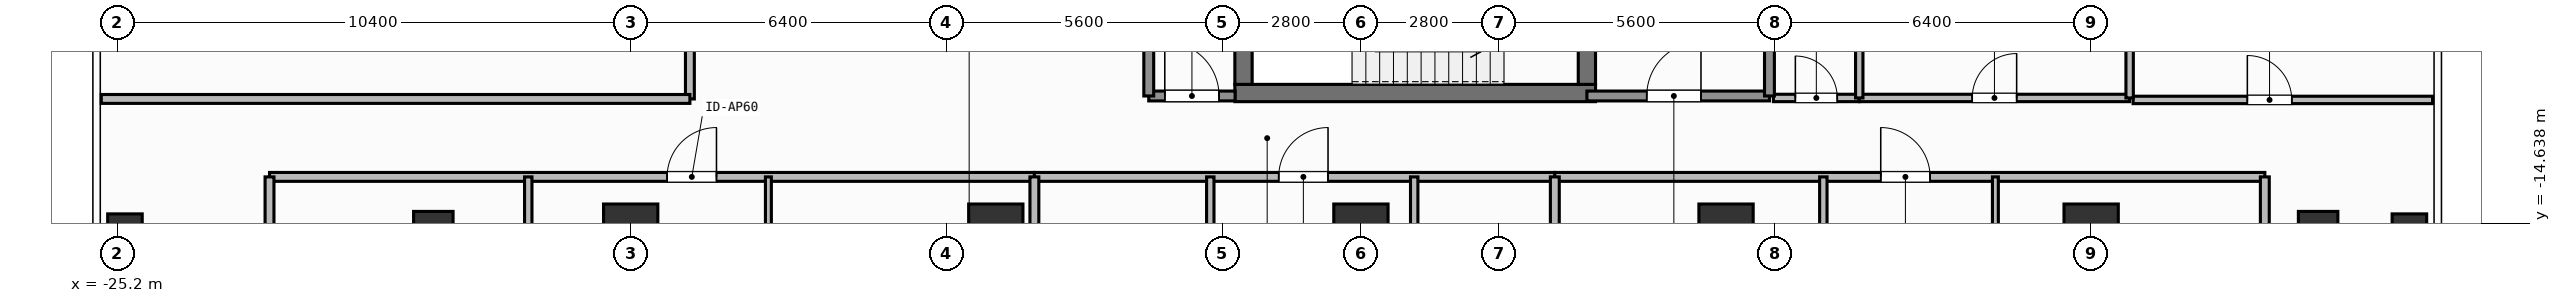
"""IFC4 building model, lengths in metres.
Left out: names, types, materials, properties, quantities, classifications, styles, units other than length and angle.
Written with IfcOpenShell. Run it as: python <this file> out.ifc"""

import sys

from ifc_helpers import new_model, si_unit, direction, frame, frame_2d, origin, origin_2d, place, context, subcontext, project, spatial, rectangle, hollow_rectangle, extrude, element, fill, save


model = new_model("IFC4")
c1 = context("Model", 3, precision=1e-05, world=origin(), true_north=direction((0.0, 1.0)))
c2 = subcontext(c1, "Body", "Model", "MODEL_VIEW")
j1 = project(units=[si_unit("LENGTHUNIT", "METRE"), si_unit("PLANEANGLEUNIT", "RADIAN")], contexts=[c1])
p1 = place(None, origin())
s1 = spatial("IfcSite", under=j1, at=p1, CompositionType="ELEMENT")
p2 = place(p1, origin())
s2 = spatial("IfcBuilding", under=s1, at=p2, CompositionType="ELEMENT")
p3 = place(p2, frame((0.0, 0.0, 179.7)))
s3 = spatial("IfcBuildingStorey", under=s2, at=p3, CompositionType="ELEMENT", Elevation=179.7)
p4 = place(p3, frame((-2.555, -12.0, 0.0), z_axis=(0.0, 0.0, 1.0), x_axis=(1.0, 0.0, 0.0)))
e1 = element("IfcWall", 1, at=p4, inside=s3, PredefinedType="SHEAR", context=c2, shape_type="SweptSolid", body=[
    extrude(rectangle(XDim=7.31, YDim=0.35, at=frame_2d((3.655, 0.0))), origin(), (0.0, 0.0, 1.0), 3.9),
])
p5 = place(p3, frame((-2.38, -11.825, 0.0), z_axis=(0.0, 0.0, 1.0), x_axis=(0.0, 1.0, 0.0)))
e2 = element("IfcWall", 2, at=p5, inside=s3, PredefinedType="SHEAR", context=c2, shape_type="SweptSolid", body=[
    extrude(rectangle(XDim=2.925, YDim=0.35, at=frame_2d((1.462, 0.0))), origin(), (0.0, 0.0, 1.0), 3.9),
])
p6 = place(p3, frame((4.58, -8.9, 0.0), z_axis=(0.0, 0.0, 1.0), x_axis=(0.0, -1.0, 0.0)))
e3 = element("IfcWall", 3, at=p6, inside=s3, PredefinedType="SHEAR", context=c2, shape_type="SweptSolid", body=[
    extrude(rectangle(XDim=2.925, YDim=0.35, at=frame_2d((1.462, 0.0))), origin(), (0.0, 0.0, 1.0), 3.9),
])
p7 = place(p6, frame((0.913, 0.0, 0.0)))
e4 = element("IfcOpeningElement", 4, at=p7, cuts=e3, PredefinedType="OPENING", context=c2, shape_type="SweptSolid", body=[
    extrude(rectangle(XDim=1.1, YDim=2.15, at=frame_2d((0.55, 1.075))), frame((0.0, 0.185, 0.0), z_axis=(0.0, -1.0, 0.0), x_axis=(1.0, 0.0, 0.0)), (0.0, 0.0, 1.0), 0.37),
])
for number, where, z_axis, x_axis in (
    (5, (-14.8, -14.8, 0.0), (0.0, 0.0, 1.0), (1.0, 0.0, 0.0)),
    (6, (-7.4, -14.8, 0.0), (0.0, 0.0, 1.0), (1.0, 0.0, 0.0)),
    (7, (0.0, -14.8, 0.0), (0.0, 0.0, 1.0), (1.0, 0.0, 0.0)),
    (8, (7.4, -14.8, 0.0), (0.0, 0.0, 1.0), (1.0, 0.0, 0.0)),
    (9, (14.8, -14.8, 0.0), (0.0, 0.0, 1.0), (1.0, 0.0, 0.0)),
):
    element("IfcColumn", number, at=place(p3, frame(where, z_axis=z_axis, x_axis=x_axis)), inside=s3, PredefinedType="COLUMN", context=c2, shape_type="SweptSolid", body=[
        extrude(rectangle(XDim=1.1, YDim=1.1, at=origin_2d()), origin(), (0.0, 0.0, 1.0), 3.9),
    ])
for number, where, z_axis, x_axis in (
    (10, (-18.8, -14.8, 0.0), (0.0, 0.0, 1.0), (1.0, 0.0, 0.0)),
    (11, (19.4, -14.8, 0.0), (0.0, 0.0, 1.0), (1.0, 0.0, 0.0)),
):
    element("IfcColumn", number, at=place(p3, frame(where, z_axis=z_axis, x_axis=x_axis)), inside=s3, PredefinedType="COLUMN", context=c2, shape_type="SweptSolid", body=[
        extrude(hollow_rectangle(XDim=0.8, YDim=0.8, WallThickness=0.036, at=origin_2d()), origin(), (0.0, 0.0, 1.0), 3.9),
    ])
for number, where, z_axis, x_axis in (
    (12, (-25.05, -14.8, 0.0), (0.0, 0.0, 1.0), (1.0, 0.0, 0.0)),
    (13, (21.25, -14.8, 0.0), (0.0, 0.0, 1.0), (1.0, 0.0, 0.0)),
):
    element("IfcColumn", number, at=place(p3, frame(where, z_axis=z_axis, x_axis=x_axis)), inside=s3, PredefinedType="COLUMN", context=c2, shape_type="SweptSolid", body=[
        extrude(hollow_rectangle(XDim=0.7, YDim=0.7, WallThickness=0.032, at=origin_2d()), origin(), (0.0, 0.0, 1.0), 3.9),
    ])
p8 = place(p3, frame((4.58, -12.06, 0.0), z_axis=(0.0, 0.0, 1.0), x_axis=(1.0, 0.0, 0.0)))
e14 = element("IfcWall", 14, at=p8, inside=s3, PredefinedType="SOLIDWALL", context=c2, shape_type="SweptSolid", body=[
    extrude(rectangle(XDim=3.7, YDim=0.2, at=frame_2d((1.85, 0.0))), origin(), (0.0, 0.0, 1.0), 3.68),
])
p9 = place(p8, frame((1.212, 0.0, 0.0)))
e15 = element("IfcOpeningElement", 15, at=p9, cuts=e14, PredefinedType="OPENING", context=c2, shape_type="SweptSolid", body=[
    extrude(rectangle(XDim=1.1, YDim=2.15, at=frame_2d((0.55, 1.075))), frame((0.0, 0.11, 0.0), z_axis=(0.0, -1.0, 0.0), x_axis=(1.0, 0.0, 0.0)), (0.0, 0.0, 1.0), 0.22),
])
p10 = place(p3, frame((-4.3, -12.06, 0.0), z_axis=(0.0, 0.0, 1.0), x_axis=(1.0, 0.0, 0.0)))
e16 = element("IfcWall", 16, at=p10, inside=s3, PredefinedType="SOLIDWALL", context=c2, shape_type="SweptSolid", body=[
    extrude(rectangle(XDim=1.75, YDim=0.2, at=frame_2d((0.875, 0.0))), origin(), (0.0, 0.0, 1.0), 3.68),
])
p11 = place(p10, frame((0.325, 0.0, 0.0)))
e17 = element("IfcOpeningElement", 17, at=p11, cuts=e16, PredefinedType="OPENING", context=c2, shape_type="SweptSolid", body=[
    extrude(rectangle(XDim=1.1, YDim=2.15, at=frame_2d((0.55, 1.075))), frame((0.0, 0.11, 0.0), z_axis=(0.0, -1.0, 0.0), x_axis=(1.0, 0.0, 0.0)), (0.0, 0.0, 1.0), 0.22),
])
p12 = place(p3, frame((8.36, -12.1, 0.0), z_axis=(0.0, 0.0, 1.0), x_axis=(1.0, 0.0, 0.0)))
e18 = element("IfcWall", 18, at=p12, inside=s3, PredefinedType="PARTITIONING", context=c2, shape_type="SweptSolid", body=[
    extrude(rectangle(XDim=1.74, YDim=0.15, at=frame_2d((0.87, 0.0))), origin(), (0.0, 0.0, 1.0), 3.68),
])
p13 = place(p12, frame((0.445, 0.0, 0.0)))
e19 = element("IfcOpeningElement", 19, at=p13, cuts=e18, PredefinedType="OPENING", context=c2, shape_type="SweptSolid", body=[
    extrude(rectangle(XDim=0.85, YDim=2.1, at=frame_2d((0.425, 1.05))), frame((0.0, 0.085, 0.0), z_axis=(0.0, -1.0, 0.0), x_axis=(1.0, 0.0, 0.0)), (0.0, 0.0, 1.0), 0.17),
])
p14 = place(p3, frame((10.1, -12.1, 0.0), z_axis=(0.0, 0.0, 1.0), x_axis=(1.0, 0.0, 0.0)))
e20 = element("IfcWall", 20, at=p14, inside=s3, PredefinedType="PARTITIONING", context=c2, shape_type="SweptSolid", body=[
    extrude(rectangle(XDim=5.48, YDim=0.15, at=frame_2d((2.74, 0.0))), origin(), (0.0, 0.0, 1.0), 3.68),
])
p15 = place(p14, frame((2.29, 0.0, 0.0)))
e21 = element("IfcOpeningElement", 21, at=p15, cuts=e20, PredefinedType="OPENING", context=c2, shape_type="SweptSolid", body=[
    extrude(rectangle(XDim=0.9, YDim=2.1, at=frame_2d((0.45, 1.05))), frame((0.0, 0.085, 0.0), z_axis=(0.0, -1.0, 0.0), x_axis=(1.0, 0.0, 0.0)), (0.0, 0.0, 1.0), 0.17),
])
p16 = place(p3, frame((-22.12, -13.7, 0.0), z_axis=(0.0, 0.0, 1.0), x_axis=(1.0, 0.0, 0.0)))
e22 = element("IfcWall", 22, at=p16, inside=s3, PredefinedType="PARTITIONING", context=c2, shape_type="SweptSolid", body=[
    extrude(rectangle(XDim=15.502, YDim=0.18, at=frame_2d((7.751, 0.0))), origin(), (0.0, 0.0, 1.0), 3.68),
])
p17 = place(p16, frame((8.059, 0.0, 0.0)))
e23 = element("IfcOpeningElement", 23, at=p17, cuts=e22, PredefinedType="OPENING", context=c2, shape_type="SweptSolid", body=[
    extrude(rectangle(XDim=1.0, YDim=2.2, at=frame_2d((0.5, 1.1))), frame((0.0, 0.1, 0.0), z_axis=(0.0, -1.0, 0.0), x_axis=(1.0, 0.0, 0.0)), (0.0, 0.0, 1.0), 0.2),
])
p18 = place(p3, frame((-16.876, -19.39, 0.0), z_axis=(0.0, 0.0, 1.0), x_axis=(0.0, 1.0, 0.0)))
e24 = element("IfcWall", 24, at=p18, inside=s3, PredefinedType="PARTITIONING", context=c2, shape_type="SweptSolid", body=[
    extrude(rectangle(XDim=5.69, YDim=0.15, at=frame_2d((2.845, 0.0))), origin(), (0.0, 0.0, 1.0), 3.68),
])
p19 = place(p18, frame((2.42, 0.0, 0.0)))
e25 = element("IfcOpeningElement", 25, at=p19, cuts=e24, PredefinedType="OPENING", context=c2, shape_type="SweptSolid", body=[
    extrude(rectangle(XDim=0.85, YDim=2.1, at=frame_2d((0.425, 1.05))), frame((0.0, 0.085, 0.0), z_axis=(0.0, -1.0, 0.0), x_axis=(1.0, 0.0, 0.0)), (0.0, 0.0, 1.0), 0.17),
])
p20 = place(p3, frame((-12.009, -17.683, 0.0), z_axis=(0.0, 0.0, 1.0), x_axis=(0.0, 1.0, 0.0)))
e26 = element("IfcWall", 26, at=p20, inside=s3, PredefinedType="PARTITIONING", context=c2, shape_type="SweptSolid", body=[
    extrude(rectangle(XDim=3.983, YDim=0.12, at=frame_2d((1.992, 0.0))), origin(), (0.0, 0.0, 1.0), 3.68),
])
p21 = place(p20, frame((1.566, 0.0, 0.0)))
e27 = element("IfcOpeningElement", 27, at=p21, cuts=e26, PredefinedType="OPENING", context=c2, shape_type="SweptSolid", body=[
    extrude(rectangle(XDim=0.85, YDim=2.1, at=frame_2d((0.425, 1.05))), frame((0.0, 0.07, 0.0), z_axis=(0.0, -1.0, 0.0), x_axis=(1.0, 0.0, 0.0)), (0.0, 0.0, 1.0), 0.14),
])
p22 = place(p3, frame((-6.618, -13.7, 0.0), z_axis=(0.0, 0.0, 1.0), x_axis=(1.0, 0.0, 0.0)))
e28 = element("IfcWall", 28, at=p22, inside=s3, PredefinedType="PARTITIONING", context=c2, shape_type="SweptSolid", body=[
    extrude(rectangle(XDim=10.548, YDim=0.18, at=frame_2d((5.274, 0.0))), origin(), (0.0, 0.0, 1.0), 3.68),
])
p23 = place(p22, frame((4.951, 0.0, 0.0)))
e29 = element("IfcOpeningElement", 29, at=p23, cuts=e28, PredefinedType="OPENING", context=c2, shape_type="SweptSolid", body=[
    extrude(rectangle(XDim=1.0, YDim=2.2, at=frame_2d((0.5, 1.1))), frame((0.0, 0.1, 0.0), z_axis=(0.0, -1.0, 0.0), x_axis=(1.0, 0.0, 0.0)), (0.0, 0.0, 1.0), 0.2),
])
p24 = place(p3, frame((-3.053, -19.39, 0.0), z_axis=(0.0, 0.0, 1.0), x_axis=(0.0, 1.0, 0.0)))
e30 = element("IfcWall", 30, at=p24, inside=s3, PredefinedType="PARTITIONING", context=c2, shape_type="SweptSolid", body=[
    extrude(rectangle(XDim=5.69, YDim=0.15, at=frame_2d((2.845, 0.0))), origin(), (0.0, 0.0, 1.0), 3.68),
])
p25 = place(p24, frame((2.42, 0.0, 0.0)))
e31 = element("IfcOpeningElement", 31, at=p25, cuts=e30, PredefinedType="OPENING", context=c2, shape_type="SweptSolid", body=[
    extrude(rectangle(XDim=0.85, YDim=2.1, at=frame_2d((0.425, 1.05))), frame((0.0, 0.085, 0.0), z_axis=(0.0, -1.0, 0.0), x_axis=(1.0, 0.0, 0.0)), (0.0, 0.0, 1.0), 0.17),
])
p26 = place(p3, frame((1.08, -19.39, 0.0), z_axis=(0.0, 0.0, 1.0), x_axis=(0.0, 1.0, 0.0)))
e32 = element("IfcWall", 32, at=p26, inside=s3, PredefinedType="PARTITIONING", context=c2, shape_type="SweptSolid", body=[
    extrude(rectangle(XDim=5.69, YDim=0.15, at=frame_2d((2.845, 0.0))), origin(), (0.0, 0.0, 1.0), 3.68),
])
p27 = place(p26, frame((2.42, 0.0, 0.0)))
e33 = element("IfcOpeningElement", 33, at=p27, cuts=e32, PredefinedType="OPENING", context=c2, shape_type="SweptSolid", body=[
    extrude(rectangle(XDim=0.85, YDim=2.1, at=frame_2d((0.425, 1.05))), frame((0.0, 0.085, 0.0), z_axis=(0.0, -1.0, 0.0), x_axis=(1.0, 0.0, 0.0)), (0.0, 0.0, 1.0), 0.17),
])
p28 = place(p3, frame((3.93, -13.7, 0.0), z_axis=(0.0, 0.0, 1.0), x_axis=(1.0, 0.0, 0.0)))
e34 = element("IfcWall", 34, at=p28, inside=s3, PredefinedType="PARTITIONING", context=c2, shape_type="SweptSolid", body=[
    extrude(rectangle(XDim=14.39, YDim=0.18, at=frame_2d((7.195, 0.0))), origin(), (0.0, 0.0, 1.0), 3.68),
])
p29 = place(p28, frame((6.605, 0.0, 0.0)))
e35 = element("IfcOpeningElement", 35, at=p29, cuts=e34, PredefinedType="OPENING", context=c2, shape_type="SweptSolid", body=[
    extrude(rectangle(XDim=1.0, YDim=2.2, at=frame_2d((0.5, 1.1))), frame((0.0, 0.1, 0.0), z_axis=(0.0, -1.0, 0.0), x_axis=(1.0, 0.0, 0.0)), (0.0, 0.0, 1.0), 0.2),
])
p30 = place(p3, frame((9.372, -19.39, 0.0), z_axis=(0.0, 0.0, 1.0), x_axis=(0.0, 1.0, 0.0)))
e36 = element("IfcWall", 36, at=p30, inside=s3, PredefinedType="PARTITIONING", context=c2, shape_type="SweptSolid", body=[
    extrude(rectangle(XDim=5.69, YDim=0.15, at=frame_2d((2.845, 0.0))), origin(), (0.0, 0.0, 1.0), 3.68),
])
p31 = place(p30, frame((2.42, 0.0, 0.0)))
e37 = element("IfcOpeningElement", 37, at=p31, cuts=e36, PredefinedType="OPENING", context=c2, shape_type="SweptSolid", body=[
    extrude(rectangle(XDim=0.85, YDim=2.1, at=frame_2d((0.425, 1.05))), frame((0.0, 0.085, 0.0), z_axis=(0.0, -1.0, 0.0), x_axis=(1.0, 0.0, 0.0)), (0.0, 0.0, 1.0), 0.17),
])
p32 = place(p3, frame((12.859, -17.683, 0.0), z_axis=(0.0, 0.0, 1.0), x_axis=(0.0, 1.0, 0.0)))
e38 = element("IfcWall", 38, at=p32, inside=s3, PredefinedType="PARTITIONING", context=c2, shape_type="SweptSolid", body=[
    extrude(rectangle(XDim=3.983, YDim=0.12, at=frame_2d((1.992, 0.0))), origin(), (0.0, 0.0, 1.0), 3.68),
])
p33 = place(p32, frame((1.391, 0.0, 0.0)))
e39 = element("IfcOpeningElement", 39, at=p33, cuts=e38, PredefinedType="OPENING", context=c2, shape_type="SweptSolid", body=[
    extrude(rectangle(XDim=0.85, YDim=2.1, at=frame_2d((0.425, 1.05))), frame((0.0, 0.07, 0.0), z_axis=(0.0, -1.0, 0.0), x_axis=(1.0, 0.0, 0.0)), (0.0, 0.0, 1.0), 0.14),
])
p34 = place(p3, frame((-13.6, -12.12, 0.0), z_axis=(0.0, 0.0, 1.0), x_axis=(0.0, 1.0, 0.0)))
e40 = element("IfcWall", 40, at=p34, inside=s3, PredefinedType="PARTITIONING", context=c2, shape_type="SweptSolid", body=[
    extrude(rectangle(XDim=6.771, YDim=0.18, at=frame_2d((3.385, 0.0))), origin(), (0.0, 0.0, 1.0), 3.68),
])
p35 = place(p34, frame((1.215, 0.0, 0.0)))
e41 = element("IfcOpeningElement", 41, at=p35, cuts=e40, PredefinedType="OPENING", context=c2, shape_type="SweptSolid", body=[
    extrude(rectangle(XDim=1.0, YDim=2.2, at=frame_2d((0.5, 1.1))), frame((0.0, 0.1, 0.0), z_axis=(0.0, -1.0, 0.0), x_axis=(1.0, 0.0, 0.0)), (0.0, 0.0, 1.0), 0.2),
])
p36 = place(p3, frame((15.65, -12.14, 0.0), z_axis=(0.0, 0.0, 1.0), x_axis=(1.0, 0.0, 0.0)))
e42 = element("IfcWall", 42, at=p36, inside=s3, PredefinedType="PARTITIONING", context=c2, shape_type="SweptSolid", body=[
    extrude(rectangle(XDim=6.07, YDim=0.15, at=frame_2d((3.035, 0.0))), origin(), (0.0, 0.0, 1.0), 3.68),
])
p37 = place(p36, frame((2.316, 0.0, 0.0)))
e43 = element("IfcOpeningElement", 43, at=p37, cuts=e42, PredefinedType="OPENING", context=c2, shape_type="SweptSolid", body=[
    extrude(rectangle(XDim=0.9, YDim=2.1, at=frame_2d((0.45, 1.05))), frame((0.0, 0.085, 0.0), z_axis=(0.0, -1.0, 0.0), x_axis=(1.0, 0.0, 0.0)), (0.0, 0.0, 1.0), 0.17),
])
for number, where, z_axis, x_axis in (
    (44, (8.28, -12.06, 0.0), (0.0, 0.0, 1.0), (0.0, 1.0, 0.0)),
    (45, (-4.3, -12.06, 0.0), (0.0, 0.0, 1.0), (0.0, 1.0, 0.0)),
):
    element("IfcWall", number, at=place(p3, frame(where, z_axis=z_axis, x_axis=x_axis)), inside=s3, PredefinedType="SOLIDWALL", context=c2, shape_type="SweptSolid", body=[
        extrude(rectangle(XDim=3.26, YDim=0.2, at=frame_2d((1.63, 0.0))), origin(), (0.0, 0.0, 1.0), 3.68),
    ])
p38 = place(p3, frame((10.1, -12.1, 0.0), z_axis=(0.0, 0.0, 1.0), x_axis=(0.0, 1.0, 0.0)))
e46 = element("IfcWall", 46, at=p38, inside=s3, PredefinedType="PARTITIONING", context=c2, shape_type="SweptSolid", body=[
    extrude(rectangle(XDim=2.35, YDim=0.15, at=frame_2d((1.175, 0.0))), origin(), (0.0, 0.0, 1.0), 3.68),
])
p39 = place(p3, frame((15.58, -12.1, 0.0), z_axis=(0.0, 0.0, 1.0), x_axis=(0.0, 1.0, 0.0)))
e47 = element("IfcWall", 47, at=p39, inside=s3, PredefinedType="PARTITIONING", context=c2, shape_type="SweptSolid", body=[
    extrude(rectangle(XDim=6.25, YDim=0.15, at=frame_2d((3.125, 0.0))), origin(), (0.0, 0.0, 1.0), 3.68),
])
for number, where, z_axis, x_axis in (
    (48, (-22.12, -22.51, 0.0), (0.0, 0.0, 1.0), (0.0, 1.0, 0.0)),
    (49, (18.32, -22.51, 0.0), (0.0, 0.0, 1.0), (0.0, 1.0, 0.0)),
):
    element("IfcWall", number, at=place(p3, frame(where, z_axis=z_axis, x_axis=x_axis)), inside=s3, PredefinedType="PARTITIONING", context=c2, shape_type="SweptSolid", body=[
        extrude(rectangle(XDim=8.81, YDim=0.18, at=frame_2d((4.405, 0.0))), origin(), (0.0, 0.0, 1.0), 3.68),
    ])
for number, where, z_axis, x_axis in (
    (50, (-6.618, -23.63, 0.0), (0.0, 0.0, 1.0), (0.0, 1.0, 0.0)),
    (51, (3.93, -23.63, 0.0), (0.0, 0.0, 1.0), (0.0, 1.0, 0.0)),
):
    element("IfcWall", number, at=place(p3, frame(where, z_axis=z_axis, x_axis=x_axis)), inside=s3, PredefinedType="PARTITIONING", context=c2, shape_type="SweptSolid", body=[
        extrude(rectangle(XDim=9.93, YDim=0.18, at=frame_2d((4.965, 0.0))), origin(), (0.0, 0.0, 1.0), 3.68),
    ])
p40 = place(p3, frame((-25.53, -12.12, 0.0), z_axis=(0.0, 0.0, 1.0), x_axis=(1.0, 0.0, 0.0)))
e52 = element("IfcWall", 52, at=p40, inside=s3, PredefinedType="PARTITIONING", context=c2, shape_type="SweptSolid", body=[
    extrude(rectangle(XDim=11.93, YDim=0.18, at=frame_2d((5.965, 0.0))), origin(), (0.0, 0.0, 1.0), 3.68),
])
p41 = place(p9, origin())
e53 = element("IfcDoor", 53, at=p41, inside=s3, OperationType="SINGLE_SWING_RIGHT", PredefinedType="DOOR", context=c2, shape_type="SweptSolid", body=[
    extrude(rectangle(XDim=1.1, YDim=2.15, at=frame_2d((0.55, 1.075))), frame((0.0, 0.025, 0.0), z_axis=(0.0, -1.0, 0.0), x_axis=(1.0, 0.0, 0.0)), (0.0, 0.0, 1.0), 0.05),
])
fill(e15, e53)
p42 = place(p11, origin())
e54 = element("IfcDoor", 54, at=p42, inside=s3, OperationType="SINGLE_SWING_LEFT", PredefinedType="DOOR", context=c2, shape_type="SweptSolid", body=[
    extrude(rectangle(XDim=1.1, YDim=2.15, at=frame_2d((0.55, 1.075))), frame((0.0, 0.025, 0.0), z_axis=(0.0, -1.0, 0.0), x_axis=(1.0, 0.0, 0.0)), (0.0, 0.0, 1.0), 0.05),
])
fill(e17, e54)
p43 = place(p13, origin())
e55 = element("IfcDoor", 55, at=p43, inside=s3, OperationType="SINGLE_SWING_LEFT", PredefinedType="DOOR", context=c2, shape_type="SweptSolid", body=[
    extrude(rectangle(XDim=0.85, YDim=2.1, at=frame_2d((0.425, 1.05))), frame((0.0, 0.025, 0.0), z_axis=(0.0, -1.0, 0.0), x_axis=(1.0, 0.0, 0.0)), (0.0, 0.0, 1.0), 0.05),
])
fill(e19, e55)
p44 = place(p15, origin())
e56 = element("IfcDoor", 56, at=p44, inside=s3, OperationType="SINGLE_SWING_RIGHT", PredefinedType="DOOR", context=c2, shape_type="SweptSolid", body=[
    extrude(rectangle(XDim=0.9, YDim=2.1, at=frame_2d((0.45, 1.05))), frame((0.0, 0.025, 0.0), z_axis=(0.0, -1.0, 0.0), x_axis=(1.0, 0.0, 0.0)), (0.0, 0.0, 1.0), 0.05),
])
fill(e21, e56)
p45 = place(p17, origin())
e57 = element("IfcDoor", 57, at=p45, inside=s3, OperationType="SINGLE_SWING_RIGHT", PredefinedType="DOOR", context=c2, shape_type="SweptSolid", body=[
    extrude(rectangle(XDim=1.0, YDim=2.2, at=frame_2d((0.5, 1.1))), frame((0.0, 0.025, 0.0), z_axis=(0.0, -1.0, 0.0), x_axis=(1.0, 0.0, 0.0)), (0.0, 0.0, 1.0), 0.05),
])
fill(e23, e57)
p46 = place(p23, origin())
e58 = element("IfcDoor", 58, at=p46, inside=s3, OperationType="SINGLE_SWING_RIGHT", PredefinedType="DOOR", context=c2, shape_type="SweptSolid", body=[
    extrude(rectangle(XDim=1.0, YDim=2.2, at=frame_2d((0.5, 1.1))), frame((0.0, 0.025, 0.0), z_axis=(0.0, -1.0, 0.0), x_axis=(1.0, 0.0, 0.0)), (0.0, 0.0, 1.0), 0.05),
])
fill(e29, e58)
p47 = place(p29, origin())
e59 = element("IfcDoor", 59, at=p47, inside=s3, OperationType="SINGLE_SWING_LEFT", PredefinedType="DOOR", context=c2, shape_type="SweptSolid", body=[
    extrude(rectangle(XDim=1.0, YDim=2.2, at=frame_2d((0.5, 1.1))), frame((0.0, 0.025, 0.0), z_axis=(0.0, -1.0, 0.0), x_axis=(1.0, 0.0, 0.0)), (0.0, 0.0, 1.0), 0.05),
])
fill(e35, e59)
p48 = place(p37, origin())
e60 = element("IfcDoor", 60, at=p48, inside=s3, OperationType="SINGLE_SWING_LEFT", PredefinedType="DOOR", context=c2, shape_type="SweptSolid", body=[
    extrude(rectangle(XDim=0.9, YDim=2.1, at=frame_2d((0.45, 1.05))), frame((0.0, 0.025, 0.0), z_axis=(0.0, -1.0, 0.0), x_axis=(1.0, 0.0, 0.0)), (0.0, 0.0, 1.0), 0.05),
])
fill(e43, e60)
save(model, sys.argv[1])
